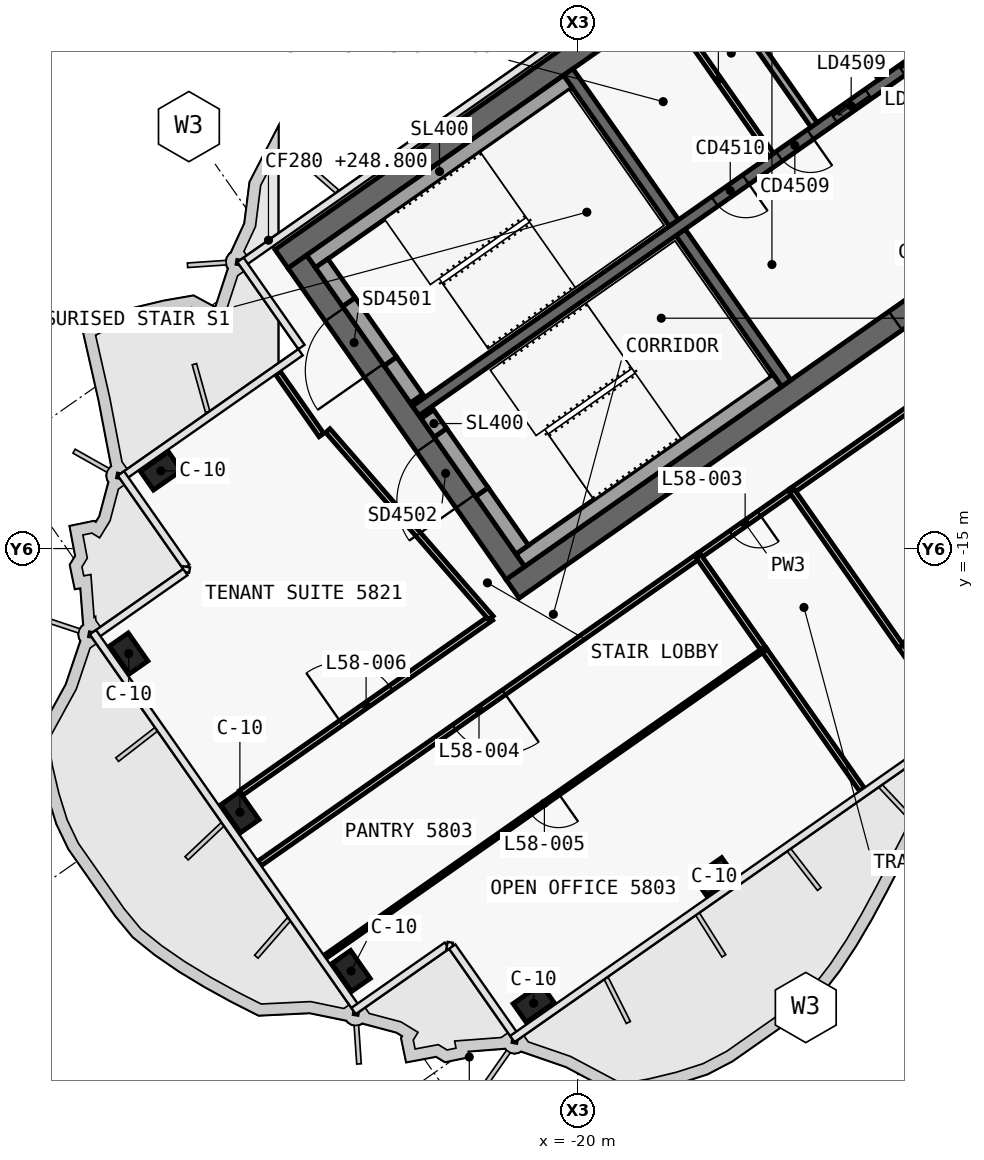
"""IFC4 building model, lengths in metres.
Left out: names, types, materials, properties, quantities, classifications, styles, units other than length and angle.
Written with IfcOpenShell. Run it as: python <this file> out.ifc"""

import sys

from ifc_helpers import new_model, si_unit, direction, frame, frame_2d, origin, origin_2d, place, context, subcontext, project, spatial, polyline, rectangle, outline, extrude, element, fill, save


model = new_model("IFC4")
c1 = context("Model", 3, precision=1e-05, world=origin(), true_north=direction((0.0, 1.0)))
c2 = subcontext(c1, "Body", "Model", "MODEL_VIEW")
j1 = project(units=[si_unit("LENGTHUNIT", "METRE"), si_unit("PLANEANGLEUNIT", "RADIAN")], contexts=[c1])
p1 = place(None, origin())
s1 = spatial("IfcSite", under=j1, at=p1, CompositionType="ELEMENT")
p2 = place(p1, origin())
s2 = spatial("IfcBuilding", under=s1, at=p2, CompositionType="ELEMENT")
p3 = place(p2, frame((0.0, 0.0, 248.8)))
s3 = spatial("IfcBuildingStorey", under=s2, at=p3, CompositionType="ELEMENT", Elevation=248.8)
p4 = place(p3, frame((-0.028, 12.066, 0.0), z_axis=(0.0, 0.0, 1.0), x_axis=(-0.819151382952, -0.573577380837, 0.0)))
e1 = element("IfcWall", 1, at=p4, inside=s3, PredefinedType="SHEAR", context=c2, shape_type="SweptSolid", body=[
    extrude(outline(polyline([(33.898, 0.3), (0.42, 0.3), (0.0, -0.3), (33.898, -0.3), (33.898, 0.3)])), origin(), (0.0, 0.0, 1.0), 3.9),
])
p5 = place(p3, frame((-0.028, -0.874, 0.0), z_axis=(0.0, 0.0, 1.0), x_axis=(-0.819150035022, -0.573579305871, 0.0)))
e2 = element("IfcWall", 2, at=p5, inside=s3, PredefinedType="SHEAR", context=c2, shape_type="SweptSolid", body=[
    extrude(outline(polyline([(26.476, 0.3), (0.42, 0.3), (0.0, -0.3), (26.476, -0.3), (26.476, 0.3)])), origin(), (0.0, 0.0, 1.0), 3.9),
])
p6 = place(p5, frame((2.976, 0.0, 0.0)))
e3 = element("IfcOpeningElement", 3, at=p6, cuts=e2, PredefinedType="OPENING", context=c2, shape_type="SweptSolid", body=[
    extrude(rectangle(XDim=2.4, YDim=2.1, at=frame_2d((1.2, 1.05))), frame((0.0, 0.31, 0.0), z_axis=(0.0, -1.0, 0.0), x_axis=(1.0, 0.0, 0.0)), (0.0, 0.0, 1.0), 0.62),
])
p7 = place(p5, frame((11.776, 0.0, 0.0)))
e4 = element("IfcOpeningElement", 4, at=p7, cuts=e2, PredefinedType="OPENING", context=c2, shape_type="SweptSolid", body=[
    extrude(rectangle(XDim=2.4, YDim=2.1, at=frame_2d((1.2, 1.05))), frame((0.0, 0.31, 0.0), z_axis=(0.0, -1.0, 0.0), x_axis=(1.0, 0.0, 0.0)), (0.0, 0.0, 1.0), 0.62),
])
p8 = place(p3, frame((-21.642, -15.642, 0.0), z_axis=(0.0, 0.0, 1.0), x_axis=(-0.573586866468, 0.819144740944, 0.0)))
e5 = element("IfcWall", 5, at=p8, inside=s3, PredefinedType="SHEAR", context=c2, shape_type="SweptSolid", body=[
    extrude(outline(polyline([(0.0, 0.3), (0.0, -0.3), (10.0, -0.3), (10.0, 0.3), (0.0, 0.3)])), origin(), (0.0, 0.0, 1.0), 3.9),
])
p9 = place(p8, frame((6.5, 0.0, 0.0)))
e6 = element("IfcOpeningElement", 6, at=p9, cuts=e5, PredefinedType="OPENING", context=c2, shape_type="SweptSolid", body=[
    extrude(rectangle(XDim=1.8, YDim=2.1, at=frame_2d((0.9, 1.05))), frame((0.0, 0.31, 0.0), z_axis=(0.0, -1.0, 0.0), x_axis=(1.0, 0.0, 0.0)), (0.0, 0.0, 1.0), 0.62),
])
p10 = place(p8, frame((2.3, 0.0, 0.0)))
e7 = element("IfcOpeningElement", 7, at=p10, cuts=e5, PredefinedType="OPENING", context=c2, shape_type="SweptSolid", body=[
    extrude(rectangle(XDim=1.8, YDim=2.1, at=frame_2d((0.9, 1.05))), frame((0.0, 0.31, 0.0), z_axis=(0.0, -1.0, 0.0), x_axis=(1.0, 0.0, 0.0)), (0.0, 0.0, 1.0), 0.62),
])
p11 = place(p3, frame((-14.515, -10.652, 0.0), z_axis=(0.0, 0.0, 1.0), x_axis=(-0.573560315113, 0.819163332265, 0.0)))
e8 = element("IfcWall", 8, at=p11, inside=s3, PredefinedType="SHEAR", context=c2, shape_type="SweptSolid", body=[
    extrude(outline(polyline([(4.85, 0.15), (0.0, 0.15), (0.0, -0.15), (4.85, -0.15), (4.85, 0.15)])), origin(), (0.0, 0.0, 1.0), 3.9),
])
p12 = place(p3, frame((-17.469, -6.433, 0.0), z_axis=(0.0, 0.0, 1.0), x_axis=(-0.573594092424, 0.81913968109, 0.0)))
e9 = element("IfcWall", 9, at=p12, inside=s3, PredefinedType="SHEAR", context=c2, shape_type="SweptSolid", body=[
    extrude(outline(polyline([(4.85, -0.15), (4.85, 0.15), (0.0, 0.15), (0.0, -0.15), (4.85, -0.15)])), origin(), (0.0, 0.0, 1.0), 3.9),
])
p13 = place(p3, frame((-2.638, 3.768, 0.0), z_axis=(0.0, 0.0, 1.0), x_axis=(-0.819155014212, -0.573572194837, 0.0)))
e10 = element("IfcWall", 10, at=p13, inside=s3, PredefinedType="SHEAR", context=c2, shape_type="SweptSolid", body=[
    extrude(outline(polyline([(26.4, 0.15), (0.0, 0.15), (0.0, -0.15), (26.4, -0.15), (26.4, 0.15)])), origin(), (0.0, 0.0, 1.0), 3.9),
])
p14 = place(p13, frame((1.169, 0.0, 0.0)))
e11 = element("IfcOpeningElement", 11, at=p14, cuts=e10, PredefinedType="OPENING", context=c2, shape_type="SweptSolid", body=[
    extrude(rectangle(XDim=1.1, YDim=2.1, at=frame_2d((0.55, 1.05))), frame((0.0, 0.16, 0.0), z_axis=(0.0, -1.0, 0.0), x_axis=(1.0, 0.0, 0.0)), (0.0, 0.0, 1.0), 0.32),
])
p15 = place(p13, frame((3.206, 0.0, 0.0)))
e12 = element("IfcOpeningElement", 12, at=p15, cuts=e10, PredefinedType="OPENING", context=c2, shape_type="SweptSolid", body=[
    extrude(rectangle(XDim=1.1, YDim=2.1, at=frame_2d((0.55, 1.05))), frame((0.0, 0.16, 0.0), z_axis=(0.0, -1.0, 0.0), x_axis=(1.0, 0.0, 0.0)), (0.0, 0.0, 1.0), 0.32),
])
p16 = place(p13, frame((5.244, 0.0, 0.0)))
e13 = element("IfcOpeningElement", 13, at=p16, cuts=e10, PredefinedType="OPENING", context=c2, shape_type="SweptSolid", body=[
    extrude(rectangle(XDim=1.1, YDim=2.1, at=frame_2d((0.55, 1.05))), frame((0.0, 0.16, 0.0), z_axis=(0.0, -1.0, 0.0), x_axis=(1.0, 0.0, 0.0)), (0.0, 0.0, 1.0), 0.32),
])
p17 = place(p13, frame((7.281, 0.0, 0.0)))
e14 = element("IfcOpeningElement", 14, at=p17, cuts=e10, PredefinedType="OPENING", context=c2, shape_type="SweptSolid", body=[
    extrude(rectangle(XDim=1.1, YDim=2.1, at=frame_2d((0.55, 1.05))), frame((0.0, 0.16, 0.0), z_axis=(0.0, -1.0, 0.0), x_axis=(1.0, 0.0, 0.0)), (0.0, 0.0, 1.0), 0.32),
])
p18 = place(p13, frame((9.688, 0.0, 0.0)))
e15 = element("IfcOpeningElement", 15, at=p18, cuts=e10, PredefinedType="OPENING", context=c2, shape_type="SweptSolid", body=[
    extrude(rectangle(XDim=1.1, YDim=2.1, at=frame_2d((0.55, 1.05))), frame((0.0, 0.16, 0.0), z_axis=(0.0, -1.0, 0.0), x_axis=(1.0, 0.0, 0.0)), (0.0, 0.0, 1.0), 0.32),
])
p19 = place(p13, frame((11.863, 0.0, 0.0)))
e16 = element("IfcOpeningElement", 16, at=p19, cuts=e10, PredefinedType="OPENING", context=c2, shape_type="SweptSolid", body=[
    extrude(rectangle(XDim=1.1, YDim=2.1, at=frame_2d((0.55, 1.05))), frame((0.0, 0.16, 0.0), z_axis=(0.0, -1.0, 0.0), x_axis=(1.0, 0.0, 0.0)), (0.0, 0.0, 1.0), 0.32),
])
p20 = place(p13, frame((13.722, 0.0, 0.0)))
e17 = element("IfcOpeningElement", 17, at=p20, cuts=e10, PredefinedType="OPENING", context=c2, shape_type="SweptSolid", body=[
    extrude(rectangle(XDim=1.0, YDim=2.1, at=frame_2d((0.5, 1.05))), frame((0.0, 0.16, 0.0), z_axis=(0.0, -1.0, 0.0), x_axis=(1.0, 0.0, 0.0)), (0.0, 0.0, 1.0), 0.32),
])
p21 = place(p13, frame((15.798, 0.0, 0.0)))
e18 = element("IfcOpeningElement", 18, at=p21, cuts=e10, PredefinedType="OPENING", context=c2, shape_type="SweptSolid", body=[
    extrude(rectangle(XDim=1.0, YDim=2.1, at=frame_2d((0.5, 1.05))), frame((0.0, 0.16, 0.0), z_axis=(0.0, -1.0, 0.0), x_axis=(1.0, 0.0, 0.0)), (0.0, 0.0, 1.0), 0.32),
])
for number, where, z_axis, x_axis in (
    (19, (-16.41, -23.637, 0.0), (0.0, 0.0, 1.0), (-0.819, -0.574, 0.0)),
    (20, (-21.161, -26.964, 0.0), (0.0, 0.0, 1.0), (-0.819, -0.574, 0.0)),
    (21, (-30.969, -12.956, 0.0), (0.0, 0.0, 1.0), (-0.819, -0.574, 0.0)),
    (22, (-25.966, -26.117, 0.0), (0.0, 0.0, 1.0), (-0.574, 0.819, 0.0)),
    (23, (-28.891, -21.939, 0.0), (0.0, 0.0, 1.0), (-0.574, 0.819, 0.0)),
    (24, (-31.816, -17.761, 0.0), (0.0, 0.0, 1.0), (-0.574, 0.819, 0.0)),
):
    element("IfcColumn", number, at=place(p3, frame(where, z_axis=z_axis, x_axis=x_axis)), inside=s3, PredefinedType="COLUMN", context=c2, shape_type="SweptSolid", body=[
        extrude(rectangle(XDim=0.9, YDim=0.6, at=origin_2d()), origin(), (0.0, 0.0, 1.0), 3.9),
    ])
p22 = place(p3, frame((-14.909, -4.641, 0.0), z_axis=(0.0, 0.0, 1.0), x_axis=(-0.573560315113, 0.819163332265, 0.0)))
e25 = element("IfcWall", 25, at=p22, inside=s3, PredefinedType="PARTITIONING", context=c2, shape_type="SweptSolid", body=[
    extrude(rectangle(XDim=4.85, YDim=0.15, at=frame_2d((2.425, 0.0))), origin(), (0.0, 0.0, 1.0), 3.62),
])
p23 = place(p3, frame((-12.001, -2.605, 0.0), z_axis=(0.0, 0.0, 1.0), x_axis=(-0.573560315113, 0.819163332265, 0.0)))
e26 = element("IfcWall", 26, at=p23, inside=s3, PredefinedType="SOLIDWALL", context=c2, shape_type="SweptSolid", body=[
    extrude(rectangle(XDim=4.85, YDim=0.2, at=frame_2d((2.425, 0.0))), origin(), (0.0, 0.0, 1.0), 3.9),
])
p24 = place(p3, frame((-13.783, -3.852, 0.0), z_axis=(0.0, 0.0, 1.0), x_axis=(-0.573594092424, 0.81913968109, 0.0)))
e27 = element("IfcWall", 27, at=p24, inside=s3, PredefinedType="SOLIDWALL", context=c2, shape_type="SweptSolid", body=[
    extrude(rectangle(XDim=4.85, YDim=0.2, at=frame_2d((2.425, 0.0))), origin(), (0.0, 0.0, 1.0), 3.9),
])
p25 = place(p3, frame((-20.259, -2.71, 0.0), z_axis=(0.0, 0.0, 1.0), x_axis=(-0.81914849389, -0.573581506813, 0.0)))
e28 = element("IfcWall", 28, at=p25, inside=s3, PredefinedType="SOLIDWALL", context=c2, shape_type="SweptSolid", body=[
    extrude(rectangle(XDim=8.25, YDim=0.4, at=frame_2d((4.125, 0.0))), origin(), (0.0, 0.0, 1.0), 3.62),
])
p26 = place(p3, frame((-24.244, -11.055, 0.0), z_axis=(0.0, 0.0, 1.0), x_axis=(-0.573571582932, 0.819155442668, 0.0)))
e29 = element("IfcWall", 29, at=p26, inside=s3, PredefinedType="SOLIDWALL", context=c2, shape_type="SweptSolid", body=[
    extrude(rectangle(XDim=1.2, YDim=0.4, at=frame_2d((0.6, 0.0))), origin(), (0.0, 0.0, 1.0), 3.62),
])
p27 = place(p3, frame((-26.022, -8.515, 0.0), z_axis=(0.0, 0.0, 1.0), x_axis=(-0.573619628835, 0.819121798889, 0.0)))
e30 = element("IfcWall", 30, at=p27, inside=s3, PredefinedType="SOLIDWALL", context=c2, shape_type="SweptSolid", body=[
    extrude(rectangle(XDim=1.25, YDim=0.4, at=frame_2d((0.625, 0.0))), origin(), (0.0, 0.0, 1.0), 3.62),
])
p28 = place(p3, frame((-24.932, -10.072, 2.15), z_axis=(0.0, 0.0, 1.0), x_axis=(-0.573591692345, 0.819141361715, 0.0)))
e31 = element("IfcWall", 31, at=p28, inside=s3, PredefinedType="SOLIDWALL", context=c2, shape_type="SweptSolid", body=[
    extrude(rectangle(XDim=1.9, YDim=0.4, at=frame_2d((0.95, 0.0))), origin(), (0.0, 0.0, 1.0), 1.47),
])
p29 = place(p3, frame((-14.753, -10.574, 0.0), z_axis=(0.0, 0.0, 1.0), x_axis=(-0.819158229677, -0.573567602601, 0.0)))
e32 = element("IfcWall", 32, at=p29, inside=s3, PredefinedType="SOLIDWALL", context=c2, shape_type="SweptSolid", body=[
    extrude(rectangle(XDim=8.25, YDim=0.4, at=frame_2d((4.125, 0.0))), origin(), (0.0, 0.0, 1.0), 3.62),
])
p30 = place(p3, frame((-21.462, -15.028, 0.0), z_axis=(0.0, 0.0, 1.0), x_axis=(-0.573559770908, 0.819163713305, 0.0)))
e33 = element("IfcWall", 33, at=p30, inside=s3, PredefinedType="SOLIDWALL", context=c2, shape_type="SweptSolid", body=[
    extrude(rectangle(XDim=1.85, YDim=0.4, at=frame_2d((0.925, 0.0))), origin(), (0.0, 0.0, 1.0), 3.62),
])
p31 = place(p3, frame((-23.613, -11.956, 0.0), z_axis=(0.0, 0.0, 1.0), x_axis=(-0.573435029941, 0.819251039936, 0.0)))
e34 = element("IfcWall", 34, at=p31, inside=s3, PredefinedType="SOLIDWALL", context=c2, shape_type="SweptSolid", body=[
    extrude(rectangle(XDim=0.6, YDim=0.4, at=frame_2d((0.3, 0.0))), origin(), (0.0, 0.0, 1.0), 3.62),
])
p32 = place(p3, frame((-22.523, -13.512, 2.15), z_axis=(0.0, 0.0, 1.0), x_axis=(-0.573591692345, 0.819141361715, 0.0)))
e35 = element("IfcWall", 35, at=p32, inside=s3, PredefinedType="SOLIDWALL", context=c2, shape_type="SweptSolid", body=[
    extrude(rectangle(XDim=1.9, YDim=0.4, at=frame_2d((0.95, 0.0))), origin(), (0.0, 0.0, 1.0), 1.47),
])
p33 = place(p3, frame((-28.858, -21.428, 0.0), z_axis=(0.0, 0.0, 1.0), x_axis=(0.819137602434, 0.573597060905, 0.0)))
e36 = element("IfcWall", 36, at=p33, inside=s3, PredefinedType="PARTITIONING", context=c2, shape_type="SweptSolid", body=[
    extrude(rectangle(XDim=8.027, YDim=0.15, at=frame_2d((4.013, 0.0))), origin(), (0.0, 0.0, 1.0), 3.05),
])
p34 = place(p33, frame((3.213, 0.0, 0.0)))
e37 = element("IfcOpeningElement", 37, at=p34, cuts=e36, PredefinedType="OPENING", context=c2, shape_type="SweptSolid", body=[
    extrude(rectangle(XDim=1.6, YDim=2.1, at=frame_2d((0.8, 1.05))), frame((0.0, 0.085, 0.0), z_axis=(0.0, -1.0, 0.0), x_axis=(1.0, 0.0, 0.0)), (0.0, 0.0, 1.0), 0.17),
])
p35 = place(p3, frame((-5.766, -7.456, 0.0), z_axis=(0.0, 0.0, 1.0), x_axis=(-0.819154371039, -0.573573113393, 0.0)))
e38 = element("IfcWall", 38, at=p35, inside=s3, PredefinedType="PARTITIONING", context=c2, shape_type="SweptSolid", body=[
    extrude(rectangle(XDim=10.502, YDim=0.15, at=frame_2d((5.251, 0.0))), origin(), (0.0, 0.0, 1.0), 3.05),
])
p36 = place(p35, frame((4.451, 0.0, 0.0)))
e39 = element("IfcOpeningElement", 39, at=p36, cuts=e38, PredefinedType="OPENING", context=c2, shape_type="SweptSolid", body=[
    extrude(rectangle(XDim=1.6, YDim=2.1, at=frame_2d((0.8, 1.05))), frame((0.0, 0.085, 0.0), z_axis=(0.0, -1.0, 0.0), x_axis=(1.0, 0.0, 0.0)), (0.0, 0.0, 1.0), 0.17),
])
p37 = place(p3, frame((-14.366, -13.477, 0.0), z_axis=(0.0, 0.0, 1.0), x_axis=(-0.819193738533, -0.573516886193, 0.0)))
e40 = element("IfcWall", 40, at=p37, inside=s3, PredefinedType="PARTITIONING", context=c2, shape_type="SweptSolid", body=[
    extrude(rectangle(XDim=3.004, YDim=0.15, at=frame_2d((1.502, 0.0))), origin(), (0.0, 0.0, 1.0), 3.62),
])
p38 = place(p37, frame((1.052, 0.0, 0.0)))
e41 = element("IfcOpeningElement", 41, at=p38, cuts=e40, PredefinedType="OPENING", context=c2, shape_type="SweptSolid", body=[
    extrude(rectangle(XDim=0.9, YDim=2.1, at=frame_2d((0.45, 1.05))), frame((0.0, 0.085, 0.0), z_axis=(0.0, -1.0, 0.0), x_axis=(1.0, 0.0, 0.0)), (0.0, 0.0, 1.0), 0.17),
])
p39 = place(p3, frame((-16.823, -15.198, 0.0), z_axis=(0.0, 0.0, 1.0), x_axis=(-0.819152205979, -0.573576205434, 0.0)))
e42 = element("IfcWall", 42, at=p39, inside=s3, PredefinedType="PARTITIONING", context=c2, shape_type="SweptSolid", body=[
    extrude(rectangle(XDim=14.102, YDim=0.15, at=frame_2d((7.051, 0.0))), origin(), (0.0, 0.0, 1.0), 3.0),
])
p40 = place(p39, frame((6.251, 0.0, 0.0)))
e43 = element("IfcOpeningElement", 43, at=p40, cuts=e42, PredefinedType="OPENING", context=c2, shape_type="SweptSolid", body=[
    extrude(rectangle(XDim=1.6, YDim=2.1, at=frame_2d((0.8, 1.05))), frame((0.0, 0.085, 0.0), z_axis=(0.0, -1.0, 0.0), x_axis=(1.0, 0.0, 0.0)), (0.0, 0.0, 1.0), 0.17),
])
p41 = place(p3, frame((-26.746, -12.014, 0.0), z_axis=(0.0, 0.0, 1.0), x_axis=(-0.573568836472, 0.819157365729, 0.0)))
e44 = element("IfcWall", 44, at=p41, inside=s3, PredefinedType="PARTITIONING", context=c2, shape_type="SweptSolid", body=[
    extrude(rectangle(XDim=2.0, YDim=0.15, at=frame_2d((1.0, 0.0))), origin(), (0.0, 0.0, 1.0), 3.05),
])
p42 = place(p3, frame((-22.284, -16.826, 0.0), z_axis=(0.0, 0.0, 1.0), x_axis=(-0.656758142177, 0.754101281449, 0.0)))
e45 = element("IfcWall", 45, at=p42, inside=s3, PredefinedType="PARTITIONING", context=c2, shape_type="SweptSolid", body=[
    extrude(rectangle(XDim=6.539, YDim=0.15, at=frame_2d((3.269, 0.0))), origin(), (0.0, 0.0, 1.0), 3.62),
])
p43 = place(p3, frame((-2.898, -11.552, 0.0), z_axis=(0.0, 0.0, 1.0), x_axis=(-0.819155448096, -0.573571575181, 0.0)))
e46 = element("IfcWall", 46, at=p43, inside=s3, PredefinedType="PARTITIONING", context=c2, shape_type="SweptSolid", body=[
    extrude(rectangle(XDim=10.5, YDim=0.1, at=frame_2d((5.25, 0.0))), origin(), (0.0, 0.0, 1.0), 3.05),
])
p44 = place(p43, frame((4.8, 0.0, 0.0)))
e47 = element("IfcOpeningElement", 47, at=p44, cuts=e46, PredefinedType="OPENING", context=c2, shape_type="SweptSolid", body=[
    extrude(rectangle(XDim=0.9, YDim=2.1, at=frame_2d((0.45, 1.05))), frame((0.0, 0.06, 0.0), z_axis=(0.0, -1.0, 0.0), x_axis=(1.0, 0.0, 0.0)), (0.0, 0.0, 1.0), 0.12),
])
p45 = place(p3, frame((-10.066, -19.622, 0.0), z_axis=(0.0, 0.0, 1.0), x_axis=(-0.573560689761, 0.819163069945, 0.0)))
e48 = element("IfcWall", 48, at=p45, inside=s3, PredefinedType="PARTITIONING", context=c2, shape_type="SweptSolid", body=[
    extrude(rectangle(XDim=2.499, YDim=0.15, at=frame_2d((1.25, 0.0))), origin(), (0.0, 0.0, 1.0), 3.0),
])
p46 = place(p3, frame((-11.5, -17.574, 0.0), z_axis=(0.0, 0.0, 1.0), x_axis=(-0.573586866468, 0.819144740944, 0.0)))
e49 = element("IfcWall", 49, at=p46, inside=s3, PredefinedType="PARTITIONING", context=c2, shape_type="SweptSolid", body=[
    extrude(rectangle(XDim=5.0, YDim=0.15, at=frame_2d((2.5, 0.0))), origin(), (0.0, 0.0, 1.0), 3.62),
])
p47 = place(p3, frame((-12.523, -21.343, 0.0), z_axis=(0.0, 0.0, 1.0), x_axis=(-0.573556991349, 0.819165659482, 0.0)))
e50 = element("IfcWall", 50, at=p47, inside=s3, PredefinedType="PARTITIONING", context=c2, shape_type="SweptSolid", body=[
    extrude(rectangle(XDim=4.501, YDim=0.15, at=frame_2d((2.25, 0.0))), origin(), (0.0, 0.0, 1.0), 3.0),
])
p48 = place(p3, frame((-15.103, -17.658, 0.0), z_axis=(0.0, 0.0, 1.0), x_axis=(-0.573604249862, 0.819132568355, 0.0)))
e51 = element("IfcWall", 51, at=p48, inside=s3, PredefinedType="PARTITIONING", context=c2, shape_type="SweptSolid", body=[
    extrude(rectangle(XDim=3.002, YDim=0.15, at=frame_2d((1.501, 0.0))), origin(), (0.0, 0.0, 1.0), 3.62),
])
p49 = place(p3, frame((-15.104, -17.657, 0.0), z_axis=(0.0, 0.0, 1.0), x_axis=(-0.81915300772, -0.573575060427, 0.0)))
e52 = element("IfcWall", 52, at=p49, inside=s3, PredefinedType="PARTITIONING", context=c2, shape_type="SweptSolid", body=[
    extrude(rectangle(XDim=14.1, YDim=0.1, at=frame_2d((7.05, 0.0))), origin(), (0.0, 0.0, 1.0), 3.0),
])
p50 = place(p49, frame((6.6, 0.0, 0.0)))
e53 = element("IfcOpeningElement", 53, at=p50, cuts=e52, PredefinedType="OPENING", context=c2, shape_type="SweptSolid", body=[
    extrude(rectangle(XDim=0.9, YDim=2.1, at=frame_2d((0.45, 1.05))), frame((0.0, 0.06, 0.0), z_axis=(0.0, -1.0, 0.0), x_axis=(1.0, 0.0, 0.0)), (0.0, 0.0, 1.0), 0.12),
])
p51 = place(p18, origin())
e54 = element("IfcDoor", 54, at=p51, inside=s3, OperationType="SLIDING_TO_LEFT", PredefinedType="DOOR", context=c2, shape_type="SweptSolid", body=[
    extrude(rectangle(XDim=1.1, YDim=2.1, at=frame_2d((0.55, 1.05))), frame((0.0, 0.025, 0.0), z_axis=(0.0, -1.0, 0.0), x_axis=(1.0, 0.0, 0.0)), (0.0, 0.0, 1.0), 0.05),
])
fill(e15, e54)
p52 = place(p19, origin())
e55 = element("IfcDoor", 55, at=p52, inside=s3, OperationType="SLIDING_TO_RIGHT", PredefinedType="DOOR", context=c2, shape_type="SweptSolid", body=[
    extrude(rectangle(XDim=1.1, YDim=2.1, at=frame_2d((0.55, 1.05))), frame((0.0, 0.025, 0.0), z_axis=(0.0, -1.0, 0.0), x_axis=(1.0, 0.0, 0.0)), (0.0, 0.0, 1.0), 0.05),
])
fill(e16, e55)
p53 = place(p20, origin())
e56 = element("IfcDoor", 56, at=p53, inside=s3, OperationType="SINGLE_SWING_RIGHT", PredefinedType="DOOR", context=c2, shape_type="SweptSolid", body=[
    extrude(rectangle(XDim=1.0, YDim=2.1, at=frame_2d((0.5, 1.05))), frame((0.0, 0.025, 0.0), z_axis=(0.0, -1.0, 0.0), x_axis=(1.0, 0.0, 0.0)), (0.0, 0.0, 1.0), 0.05),
])
fill(e17, e56)
p54 = place(p21, origin())
e57 = element("IfcDoor", 57, at=p54, inside=s3, OperationType="SINGLE_SWING_RIGHT", PredefinedType="DOOR", context=c2, shape_type="SweptSolid", body=[
    extrude(rectangle(XDim=1.0, YDim=2.1, at=frame_2d((0.5, 1.05))), frame((0.0, 0.025, 0.0), z_axis=(0.0, -1.0, 0.0), x_axis=(1.0, 0.0, 0.0)), (0.0, 0.0, 1.0), 0.05),
])
fill(e18, e57)
p55 = place(p7, origin())
e58 = element("IfcDoor", 58, at=p55, inside=s3, OperationType="DOUBLE_DOOR_SINGLE_SWING", PredefinedType="DOOR", context=c2, shape_type="SweptSolid", body=[
    extrude(rectangle(XDim=2.4, YDim=2.1, at=frame_2d((1.2, 1.05))), frame((0.0, 0.025, 0.0), z_axis=(0.0, -1.0, 0.0), x_axis=(1.0, 0.0, 0.0)), (0.0, 0.0, 1.0), 0.05),
])
fill(e4, e58)
p56 = place(p9, origin())
e59 = element("IfcDoor", 59, at=p56, inside=s3, OperationType="DOUBLE_DOOR_SINGLE_SWING", PredefinedType="DOOR", context=c2, shape_type="SweptSolid", body=[
    extrude(rectangle(XDim=1.8, YDim=2.1, at=frame_2d((0.9, 1.05))), frame((0.0, 0.025, 0.0), z_axis=(0.0, -1.0, 0.0), x_axis=(1.0, 0.0, 0.0)), (0.0, 0.0, 1.0), 0.05),
])
fill(e6, e59)
p57 = place(p10, origin())
e60 = element("IfcDoor", 60, at=p57, inside=s3, OperationType="DOUBLE_DOOR_SINGLE_SWING", PredefinedType="DOOR", context=c2, shape_type="SweptSolid", body=[
    extrude(rectangle(XDim=1.8, YDim=2.1, at=frame_2d((0.9, 1.05))), frame((0.0, 0.025, 0.0), z_axis=(0.0, -1.0, 0.0), x_axis=(1.0, 0.0, 0.0)), (0.0, 0.0, 1.0), 0.05),
])
fill(e7, e60)
p58 = place(p38, origin())
e61 = element("IfcDoor", 61, at=p58, inside=s3, OperationType="SINGLE_SWING_RIGHT", PredefinedType="DOOR", context=c2, shape_type="SweptSolid", body=[
    extrude(rectangle(XDim=0.9, YDim=2.1, at=frame_2d((0.45, 1.05))), frame((0.0, 0.025, 0.0), z_axis=(0.0, -1.0, 0.0), x_axis=(1.0, 0.0, 0.0)), (0.0, 0.0, 1.0), 0.05),
])
fill(e41, e61)
p59 = place(p40, origin())
e62 = element("IfcDoor", 62, at=p59, inside=s3, OperationType="DOUBLE_DOOR_SINGLE_SWING", PredefinedType="DOOR", context=c2, shape_type="SweptSolid", body=[
    extrude(rectangle(XDim=1.6, YDim=2.1, at=frame_2d((0.8, 1.05))), frame((0.0, 0.025, 0.0), z_axis=(0.0, -1.0, 0.0), x_axis=(1.0, 0.0, 0.0)), (0.0, 0.0, 1.0), 0.05),
])
fill(e43, e62)
p60 = place(p50, origin())
e63 = element("IfcDoor", 63, at=p60, inside=s3, OperationType="SINGLE_SWING_RIGHT", PredefinedType="DOOR", context=c2, shape_type="SweptSolid", body=[
    extrude(rectangle(XDim=0.9, YDim=2.1, at=frame_2d((0.45, 1.05))), frame((0.0, 0.025, 0.0), z_axis=(0.0, -1.0, 0.0), x_axis=(1.0, 0.0, 0.0)), (0.0, 0.0, 1.0), 0.05),
])
fill(e53, e63)
p61 = place(p34, origin())
e64 = element("IfcDoor", 64, at=p61, inside=s3, OperationType="DOUBLE_DOOR_SINGLE_SWING", PredefinedType="DOOR", context=c2, shape_type="SweptSolid", body=[
    extrude(rectangle(XDim=1.6, YDim=2.1, at=frame_2d((0.8, 1.05))), frame((0.0, 0.025, 0.0), z_axis=(0.0, -1.0, 0.0), x_axis=(1.0, 0.0, 0.0)), (0.0, 0.0, 1.0), 0.05),
])
fill(e37, e64)
save(model, sys.argv[1])
